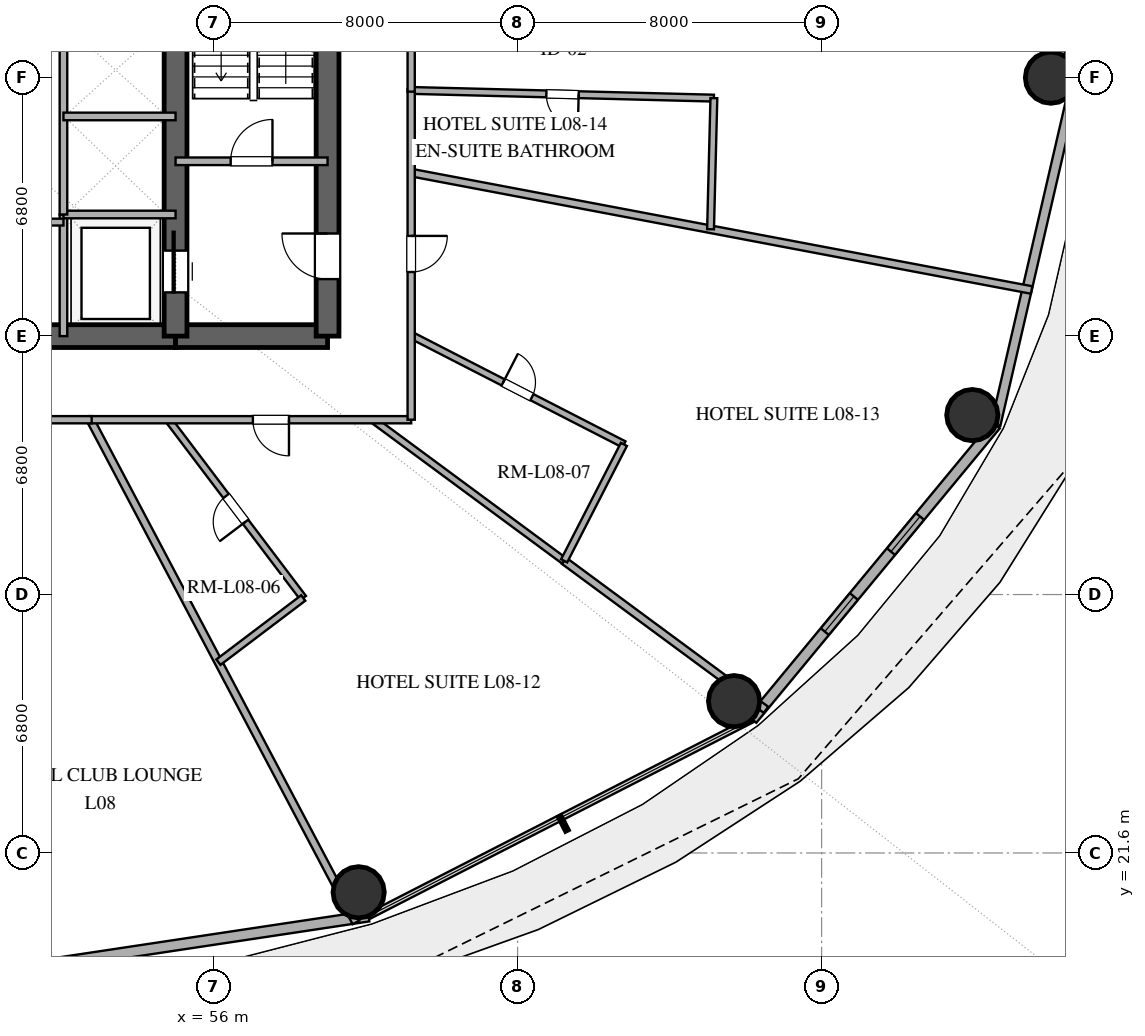
"""IFC4 building model, lengths in metres.
Left out: names, types, materials, properties, quantities, classifications, styles, units other than length and angle.
Written with IfcOpenShell. Run it as: python <this file> out.ifc"""

import sys

from ifc_helpers import new_model, si_unit, direction, frame, frame_2d, origin, origin_2d, place, context, subcontext, project, spatial, rectangle, hollow_circle, extrude, element, fill, save


model = new_model("IFC4")
c1 = context("Model", 3, precision=1e-05, world=origin(), true_north=direction((0.0, 1.0)))
c2 = subcontext(c1, "Body", "Model", "MODEL_VIEW")
j1 = project(units=[si_unit("LENGTHUNIT", "METRE"), si_unit("PLANEANGLEUNIT", "RADIAN")], contexts=[c1])
p1 = place(None, origin())
s1 = spatial("IfcSite", under=j1, at=p1, CompositionType="ELEMENT")
p2 = place(p1, origin())
s2 = spatial("IfcBuilding", under=s1, at=p2, CompositionType="ELEMENT")
p3 = place(p2, frame((0.0, 0.0, 39.0)))
s3 = spatial("IfcBuildingStorey", under=s2, at=p3, CompositionType="ELEMENT", Elevation=39.0)
p4 = place(p3, frame((41.0, 35.2, 0.0), z_axis=(0.0, 0.0, 1.0), x_axis=(1.0, 0.0, 0.0)))
e1 = element("IfcWall", 1, at=p4, inside=s3, PredefinedType="SHEAR", context=c2, shape_type="SweptSolid", body=[
    extrude(rectangle(XDim=14.0, YDim=0.6, at=frame_2d((7.0, 0.0))), origin(), (0.0, 0.0, 1.0), 3.38),
])
p5 = place(p4, frame((6.1, 0.0, 0.0)))
e2 = element("IfcOpeningElement", 2, at=p5, cuts=e1, PredefinedType="OPENING", context=c2, shape_type="SweptSolid", body=[
    extrude(rectangle(XDim=1.8, YDim=2.25, at=frame_2d((0.9, 1.125))), frame((0.0, 0.31, 0.0), z_axis=(0.0, -1.0, 0.0), x_axis=(1.0, 0.0, 0.0)), (0.0, 0.0, 1.0), 0.62),
])
p6 = place(p3, frame((55.0, 35.2, 0.0), z_axis=(0.0, 0.0, 1.0), x_axis=(1.0, 0.0, 0.0)))
e3 = element("IfcWall", 3, at=p6, inside=s3, PredefinedType="SHEAR", context=c2, shape_type="SweptSolid", body=[
    extrude(rectangle(XDim=4.0, YDim=0.6, at=frame_2d((2.0, 0.0))), origin(), (0.0, 0.0, 1.0), 3.38),
])
p7 = place(p3, frame((59.0, 35.2, 0.0), z_axis=(0.0, 0.0, 1.0), x_axis=(0.0, 1.0, 0.0)))
e4 = element("IfcWall", 4, at=p7, inside=s3, PredefinedType="SHEAR", context=c2, shape_type="SweptSolid", body=[
    extrude(rectangle(XDim=13.6, YDim=0.6, at=frame_2d((6.8, 0.0))), origin(), (0.0, 0.0, 1.0), 3.38),
])
p8 = place(p7, frame((1.5, 0.0, 0.0)))
e5 = element("IfcOpeningElement", 5, at=p8, cuts=e4, PredefinedType="OPENING", context=c2, shape_type="SweptSolid", body=[
    extrude(rectangle(XDim=1.2, YDim=2.15, at=frame_2d((0.6, 1.075))), frame((0.0, 0.31, 0.0), z_axis=(0.0, -1.0, 0.0), x_axis=(1.0, 0.0, 0.0)), (0.0, 0.0, 1.0), 0.62),
])
p9 = place(p3, frame((55.0, 35.2, 0.0), z_axis=(0.0, 0.0, 1.0), x_axis=(0.0, 1.0, 0.0)))
e6 = element("IfcWall", 6, at=p9, inside=s3, PredefinedType="SHEAR", context=c2, shape_type="SweptSolid", body=[
    extrude(rectangle(XDim=13.6, YDim=0.6, at=frame_2d((6.8, 0.0))), origin(), (0.0, 0.0, 1.0), 3.38),
])
p10 = place(p9, frame((1.15, 0.0, 0.0)))
e7 = element("IfcOpeningElement", 7, at=p10, cuts=e6, PredefinedType="OPENING", context=c2, shape_type="SweptSolid", body=[
    extrude(rectangle(XDim=1.1, YDim=2.2, at=frame_2d((0.55, 1.1))), frame((0.0, 0.31, 0.0), z_axis=(0.0, -1.0, 0.0), x_axis=(1.0, 0.0, 0.0)), (0.0, 0.0, 1.0), 0.62),
])
for number, where, z_axis, x_axis in (
    (8, (78.035, 42.0, 0.0), (0.0, 0.0, 1.0), (1.0, 0.0, 0.0)),
    (9, (59.818, 20.566, 0.0), (0.0, 0.0, 1.0), (1.0, 0.0, 0.0)),
    (10, (69.697, 25.595, 0.0), (0.0, 0.0, 1.0), (1.0, 0.0, 0.0)),
    (11, (75.966, 33.122, 0.0), (0.0, 0.0, 1.0), (1.0, 0.0, 0.0)),
):
    element("IfcColumn", number, at=place(p3, frame(where, z_axis=z_axis, x_axis=x_axis)), inside=s3, PredefinedType="COLUMN", context=c2, shape_type="SweptSolid", body=[
        extrude(hollow_circle(Radius=0.675, WallThickness=0.036, at=origin_2d()), origin(), (0.0, 0.0, 1.0), 3.38),
    ])
p11 = place(p3, frame((78.696, 42.0, 0.0), z_axis=(0.0, 0.0, 1.0), x_axis=(-0.225454452941, 0.974253709076, 0.0)))
e12 = element("IfcWall", 12, at=p11, inside=s3, PredefinedType="SOLIDWALL", context=c2, shape_type="SweptSolid", body=[
    extrude(rectangle(XDim=9.38, YDim=0.28, at=frame_2d((4.69, 0.0))), origin(), (0.0, 0.0, 1.0), 3.38),
])
p12 = place(p11, frame((1.579, 0.0, 0.0)))
e13 = element("IfcOpeningElement", 13, at=p12, cuts=e12, PredefinedType="OPENING", context=c2, shape_type="SweptSolid", body=[
    extrude(rectangle(XDim=1.6, YDim=2.25, at=frame_2d((0.8, 1.125))), frame((0.0, 0.15, 0.0), z_axis=(0.0, -1.0, 0.0), x_axis=(1.0, 0.0, 0.0)), (0.0, 0.0, 1.0), 0.3),
])
p13 = place(p3, frame((48.0, 18.12, 0.0), z_axis=(0.0, 0.0, 1.0), x_axis=(0.988864835849, 0.148816452121, 0.0)))
e14 = element("IfcWall", 14, at=p13, inside=s3, PredefinedType="SOLIDWALL", context=c2, shape_type="SweptSolid", body=[
    extrude(rectangle(XDim=12.214, YDim=0.28, at=frame_2d((6.107, 0.0))), origin(), (0.0, 0.0, 1.0), 3.38),
])
p14 = place(p13, frame((1.531, 0.0, 0.0)))
e15 = element("IfcOpeningElement", 15, at=p14, cuts=e14, PredefinedType="OPENING", context=c2, shape_type="SweptSolid", body=[
    extrude(rectangle(XDim=1.05, YDim=2.2, at=frame_2d((0.525, 1.1))), frame((0.0, 0.15, 0.0), z_axis=(0.0, -1.0, 0.0), x_axis=(1.0, 0.0, 0.0)), (0.0, 0.0, 1.0), 0.3),
])
p15 = place(p3, frame((70.174, 25.114, 0.0), z_axis=(0.0, 0.0, 1.0), x_axis=(0.637296809613, 0.770618437657, 0.0)))
e16 = element("IfcWall", 16, at=p15, inside=s3, PredefinedType="SOLIDWALL", context=c2, shape_type="SweptSolid", body=[
    extrude(rectangle(XDim=10.053, YDim=0.28, at=frame_2d((5.027, 0.0))), origin(), (0.0, 0.0, 1.0), 3.38),
])
p16 = place(p15, frame((2.998, 0.0, 0.85)))
e17 = element("IfcOpeningElement", 17, at=p16, cuts=e16, PredefinedType="OPENING", context=c2, shape_type="SweptSolid", body=[
    extrude(rectangle(XDim=1.2, YDim=1.6, at=frame_2d((0.6, 0.8))), frame((0.0, 0.15, 0.0), z_axis=(0.0, -1.0, 0.0), x_axis=(1.0, 0.0, 0.0)), (0.0, 0.0, 1.0), 0.3),
])
p17 = place(p15, frame((5.73, 0.0, 0.85)))
e18 = element("IfcOpeningElement", 18, at=p17, cuts=e16, PredefinedType="OPENING", context=c2, shape_type="SweptSolid", body=[
    extrude(rectangle(XDim=1.2, YDim=1.6, at=frame_2d((0.6, 0.8))), frame((0.0, 0.15, 0.0), z_axis=(0.0, -1.0, 0.0), x_axis=(1.0, 0.0, 0.0)), (0.0, 0.0, 1.0), 0.3),
])
p18 = place(p3, frame((76.581, 32.862, 0.0), z_axis=(0.0, 0.0, 1.0), x_axis=(0.225454452941, 0.974253709076, 0.0)))
e19 = element("IfcWall", 19, at=p18, inside=s3, PredefinedType="SOLIDWALL", context=c2, shape_type="SweptSolid", body=[
    extrude(rectangle(XDim=9.38, YDim=0.25, at=frame_2d((4.69, 0.0))), origin(), (0.0, 0.0, 1.0), 3.38),
])
p19 = place(p3, frame((55.0, 39.8, 0.0), z_axis=(0.0, 0.0, 1.0), x_axis=(1.0, 0.0, 0.0)))
e20 = element("IfcWall", 20, at=p19, inside=s3, PredefinedType="SOLIDWALL", context=c2, shape_type="SweptSolid", body=[
    extrude(rectangle(XDim=4.0, YDim=0.2, at=frame_2d((2.0, 0.0))), origin(), (0.0, 0.0, 1.0), 2.74),
])
p20 = place(p19, frame((1.45, 0.0, 0.0)))
e21 = element("IfcOpeningElement", 21, at=p20, cuts=e20, PredefinedType="OPENING", context=c2, shape_type="SweptSolid", body=[
    extrude(rectangle(XDim=1.1, YDim=2.15, at=frame_2d((0.55, 1.075))), frame((0.0, 0.11, 0.0), z_axis=(0.0, -1.0, 0.0), x_axis=(1.0, 0.0, 0.0)), (0.0, 0.0, 1.0), 0.22),
])
p21 = place(p3, frame((52.05, 35.2, 0.0), z_axis=(0.0, 0.0, 1.0), x_axis=(0.0, 1.0, 0.0)))
e22 = element("IfcWall", 22, at=p21, inside=s3, PredefinedType="SOLIDWALL", context=c2, shape_type="SweptSolid", body=[
    extrude(rectangle(XDim=3.2, YDim=0.2, at=frame_2d((1.6, 0.0))), origin(), (0.0, 0.0, 1.0), 2.74),
])
p22 = place(p3, frame((52.05, 38.4, 0.0), z_axis=(0.0, 0.0, 1.0), x_axis=(1.0, 0.0, 0.0)))
e23 = element("IfcWall", 23, at=p22, inside=s3, PredefinedType="SOLIDWALL", context=c2, shape_type="SweptSolid", body=[
    extrude(rectangle(XDim=2.95, YDim=0.2, at=frame_2d((1.475, 0.0))), origin(), (0.0, 0.0, 1.0), 2.74),
])
p23 = place(p3, frame((52.05, 38.4, 0.0), z_axis=(0.0, 0.0, 1.0), x_axis=(0.0, 1.0, 0.0)))
e24 = element("IfcWall", 24, at=p23, inside=s3, PredefinedType="SOLIDWALL", context=c2, shape_type="SweptSolid", body=[
    extrude(rectangle(XDim=10.4, YDim=0.2, at=frame_2d((5.2, 0.0))), origin(), (0.0, 0.0, 1.0), 2.74),
])
p24 = place(p23, frame((8.2, 0.0, 0.0)))
e25 = element("IfcOpeningElement", 25, at=p24, cuts=e24, PredefinedType="OPENING", context=c2, shape_type="SweptSolid", body=[
    extrude(rectangle(XDim=1.2, YDim=2.2, at=frame_2d((0.6, 1.1))), frame((0.0, 0.11, 0.0), z_axis=(0.0, -1.0, 0.0), x_axis=(1.0, 0.0, 0.0)), (0.0, 0.0, 1.0), 0.22),
])
p25 = place(p3, frame((52.05, 40.98, 0.0), z_axis=(0.0, 0.0, 1.0), x_axis=(1.0, 0.0, 0.0)))
e26 = element("IfcWall", 26, at=p25, inside=s3, PredefinedType="SOLIDWALL", context=c2, shape_type="SweptSolid", body=[
    extrude(rectangle(XDim=2.95, YDim=0.2, at=frame_2d((1.475, 0.0))), origin(), (0.0, 0.0, 1.0), 2.74),
])
p26 = place(p3, frame((49.9, 38.2, 0.0), z_axis=(0.0, 0.0, 1.0), x_axis=(1.0, 0.0, 0.0)))
e27 = element("IfcWall", 27, at=p26, inside=s3, PredefinedType="PLUMBINGWALL", context=c2, shape_type="SweptSolid", body=[
    extrude(rectangle(XDim=2.15, YDim=0.18, at=frame_2d((1.075, 0.0))), origin(), (0.0, 0.0, 1.0), 2.74),
])
p27 = place(p3, frame((61.2, 39.502, 0.0), z_axis=(0.0, 0.0, 1.0), x_axis=(0.982565603173, -0.185916205484, 0.0)))
e28 = element("IfcWall", 28, at=p27, inside=s3, PredefinedType="PARTITIONING", context=c2, shape_type="SweptSolid", body=[
    extrude(rectangle(XDim=16.616, YDim=0.2, at=frame_2d((8.308, 0.0))), origin(), (0.0, 0.0, 1.0), 2.74),
])
p28 = place(p3, frame((69.165, 41.462, 0.0), z_axis=(0.0, 0.0, 1.0), x_axis=(-0.999676564425, 0.025431605115, 0.0)))
e29 = element("IfcWall", 29, at=p28, inside=s3, PredefinedType="PLUMBINGWALL", context=c2, shape_type="SweptSolid", body=[
    extrude(rectangle(XDim=7.968, YDim=0.18, at=frame_2d((3.984, 0.0))), origin(), (0.0, 0.0, 1.0), 2.74),
])
p29 = place(p28, frame((3.559, 0.0, 0.0)))
e30 = element("IfcOpeningElement", 30, at=p29, cuts=e29, PredefinedType="OPENING", context=c2, shape_type="SweptSolid", body=[
    extrude(rectangle(XDim=0.85, YDim=2.1, at=frame_2d((0.425, 1.05))), frame((0.0, 0.1, 0.0), z_axis=(0.0, -1.0, 0.0), x_axis=(1.0, 0.0, 0.0)), (0.0, 0.0, 1.0), 0.2),
])
p30 = place(p3, frame((52.757, 33.0, 0.0), z_axis=(0.0, 0.0, 1.0), x_axis=(0.467270516294, -0.884114395654, 0.0)))
e31 = element("IfcWall", 31, at=p30, inside=s3, PredefinedType="PARTITIONING", context=c2, shape_type="SweptSolid", body=[
    extrude(rectangle(XDim=14.96, YDim=0.2, at=frame_2d((7.48, 0.0))), origin(), (0.0, 0.0, 1.0), 2.74),
])
p31 = place(p3, frame((70.538, 25.366, 0.0), z_axis=(0.0, 0.0, 1.0), x_axis=(-0.804616980297, 0.593794168898, 0.0)))
e32 = element("IfcWall", 32, at=p31, inside=s3, PredefinedType="PARTITIONING", context=c2, shape_type="SweptSolid", body=[
    extrude(rectangle(XDim=6.603, YDim=0.2, at=frame_2d((3.302, 0.0))), origin(), (0.0, 0.0, 1.0), 2.74),
])
p32 = place(p3, frame((61.2, 35.224, 0.0), z_axis=(0.0, 0.0, 1.0), x_axis=(0.889651376734, -0.456640370395, 0.0)))
e33 = element("IfcWall", 33, at=p32, inside=s3, PredefinedType="PLUMBINGWALL", context=c2, shape_type="SweptSolid", body=[
    extrude(rectangle(XDim=6.292, YDim=0.18, at=frame_2d((3.146, 0.0))), origin(), (0.0, 0.0, 1.0), 2.74),
])
p33 = place(p32, frame((2.721, 0.0, 0.0)))
e34 = element("IfcOpeningElement", 34, at=p33, cuts=e33, PredefinedType="OPENING", context=c2, shape_type="SweptSolid", body=[
    extrude(rectangle(XDim=0.85, YDim=2.1, at=frame_2d((0.425, 1.05))), frame((0.0, 0.1, 0.0), z_axis=(0.0, -1.0, 0.0), x_axis=(1.0, 0.0, 0.0)), (0.0, 0.0, 1.0), 0.2),
])
p34 = place(p3, frame((65.225, 29.287, 0.0), z_axis=(0.0, 0.0, 1.0), x_axis=(-0.804582519588, 0.593840861825, 0.0)))
e35 = element("IfcWall", 35, at=p34, inside=s3, PredefinedType="PLUMBINGWALL", context=c2, shape_type="SweptSolid", body=[
    extrude(rectangle(XDim=6.252, YDim=0.18, at=frame_2d((3.126, 0.0))), origin(), (0.0, 0.0, 1.0), 2.74),
])
p35 = place(p3, frame((58.36, 28.309, 0.0), z_axis=(0.0, 0.0, 1.0), x_axis=(-0.603401299207, 0.797437691682, 0.0)))
e36 = element("IfcWall", 36, at=p35, inside=s3, PredefinedType="PLUMBINGWALL", context=c2, shape_type="SweptSolid", body=[
    extrude(rectangle(XDim=5.882, YDim=0.18, at=frame_2d((2.941, 0.0))), origin(), (0.0, 0.0, 1.0), 2.74),
])
p36 = place(p35, frame((2.516, 0.0, 0.0)))
e37 = element("IfcOpeningElement", 37, at=p36, cuts=e36, PredefinedType="OPENING", context=c2, shape_type="SweptSolid", body=[
    extrude(rectangle(XDim=0.85, YDim=2.1, at=frame_2d((0.425, 1.05))), frame((0.0, 0.1, 0.0), z_axis=(0.0, -1.0, 0.0), x_axis=(1.0, 0.0, 0.0)), (0.0, 0.0, 1.0), 0.2),
])
p37 = place(p3, frame((61.2, 33.0, 0.0), z_axis=(0.0, 0.0, 1.0), x_axis=(-1.0, 0.0, 0.0)))
e38 = element("IfcWall", 38, at=p37, inside=s3, PredefinedType="PARTITIONING", context=c2, shape_type="SweptSolid", body=[
    extrude(rectangle(XDim=8.479, YDim=0.19, at=frame_2d((4.24, 0.0))), origin(), (0.0, 0.0, 1.0), 2.74),
])
p38 = place(p37, frame((3.216, 0.0, 0.0)))
e39 = element("IfcOpeningElement", 39, at=p38, cuts=e38, PredefinedType="OPENING", context=c2, shape_type="SweptSolid", body=[
    extrude(rectangle(XDim=0.95, YDim=2.15, at=frame_2d((0.475, 1.075))), frame((0.0, 0.105, 0.0), z_axis=(0.0, -1.0, 0.0), x_axis=(1.0, 0.0, 0.0)), (0.0, 0.0, 1.0), 0.21),
])
p39 = place(p3, frame((52.793, 33.0, 0.0), z_axis=(0.0, 0.0, 1.0), x_axis=(-1.0, 0.0, 0.0)))
e40 = element("IfcWall", 40, at=p39, inside=s3, PredefinedType="PARTITIONING", context=c2, shape_type="SweptSolid", body=[
    extrude(rectangle(XDim=8.754, YDim=0.19, at=frame_2d((4.377, 0.0))), origin(), (0.0, 0.0, 1.0), 2.74),
])
p40 = place(p39, frame((1.744, 0.0, 0.0)))
e41 = element("IfcOpeningElement", 41, at=p40, cuts=e40, PredefinedType="OPENING", context=c2, shape_type="SweptSolid", body=[
    extrude(rectangle(XDim=1.0, YDim=2.2, at=frame_2d((0.5, 1.1))), frame((0.0, 0.105, 0.0), z_axis=(0.0, -1.0, 0.0), x_axis=(1.0, 0.0, 0.0)), (0.0, 0.0, 1.0), 0.21),
])
p41 = place(p39, frame((5.298, 0.0, 0.0)))
e42 = element("IfcOpeningElement", 42, at=p41, cuts=e40, PredefinedType="OPENING", context=c2, shape_type="SweptSolid", body=[
    extrude(rectangle(XDim=0.95, YDim=2.15, at=frame_2d((0.475, 1.075))), frame((0.0, 0.105, 0.0), z_axis=(0.0, -1.0, 0.0), x_axis=(1.0, 0.0, 0.0)), (0.0, 0.0, 1.0), 0.21),
])
p42 = place(p3, frame((61.2, 41.696, 0.0), z_axis=(0.0, 0.0, 1.0), x_axis=(0.0, -1.0, 0.0)))
e43 = element("IfcWall", 43, at=p42, inside=s3, PredefinedType="PARTITIONING", context=c2, shape_type="SweptSolid", body=[
    extrude(rectangle(XDim=8.696, YDim=0.19, at=frame_2d((4.348, 0.0))), origin(), (0.0, 0.0, 1.0), 2.74),
])
p43 = place(p42, frame((3.86, 0.0, 0.0)))
e44 = element("IfcOpeningElement", 44, at=p43, cuts=e43, PredefinedType="OPENING", context=c2, shape_type="SweptSolid", body=[
    extrude(rectangle(XDim=0.95, YDim=2.15, at=frame_2d((0.475, 1.075))), frame((0.0, 0.105, 0.0), z_axis=(0.0, -1.0, 0.0), x_axis=(1.0, 0.0, 0.0)), (0.0, 0.0, 1.0), 0.21),
])
p44 = place(p3, frame((61.2, 47.983, 0.0), z_axis=(0.0, 0.0, 1.0), x_axis=(0.0, -1.0, 0.0)))
e45 = element("IfcWall", 45, at=p44, inside=s3, PredefinedType="PARTITIONING", context=c2, shape_type="SweptSolid", body=[
    extrude(rectangle(XDim=6.351, YDim=0.19, at=frame_2d((3.176, 0.0))), origin(), (0.0, 0.0, 1.0), 2.74),
])
p45 = place(p44, frame((3.907, 0.0, 0.0)))
e46 = element("IfcOpeningElement", 46, at=p45, cuts=e45, PredefinedType="OPENING", context=c2, shape_type="SweptSolid", body=[
    extrude(rectangle(XDim=0.95, YDim=2.15, at=frame_2d((0.475, 1.075))), frame((0.0, 0.105, 0.0), z_axis=(0.0, -1.0, 0.0), x_axis=(1.0, 0.0, 0.0)), (0.0, 0.0, 1.0), 0.21),
])
p46 = place(p3, frame((69.078, 38.012, 0.0), z_axis=(0.0, 0.0, 1.0), x_axis=(0.02539873932, 0.999677399985, 0.0)))
e47 = element("IfcWall", 47, at=p46, inside=s3, PredefinedType="PLUMBINGWALL", context=c2, shape_type="SweptSolid", body=[
    extrude(rectangle(XDim=3.451, YDim=0.18, at=frame_2d((1.726, 0.0))), origin(), (0.0, 0.0, 1.0), 2.74),
])
p47 = place(p3, frame((66.798, 32.351, 0.0), z_axis=(0.0, 0.0, 1.0), x_axis=(-0.456659133546, -0.889641745732, 0.0)))
e48 = element("IfcWall", 48, at=p47, inside=s3, PredefinedType="PLUMBINGWALL", context=c2, shape_type="SweptSolid", body=[
    extrude(rectangle(XDim=3.444, YDim=0.18, at=frame_2d((1.722, 0.0))), origin(), (0.0, 0.0, 1.0), 2.74),
])
p48 = place(p3, frame((56.128, 26.621, 0.0), z_axis=(0.0, 0.0, 1.0), x_axis=(0.797438154909, 0.603400687019, 0.0)))
e49 = element("IfcWall", 49, at=p48, inside=s3, PredefinedType="PLUMBINGWALL", context=c2, shape_type="SweptSolid", body=[
    extrude(rectangle(XDim=2.798, YDim=0.18, at=frame_2d((1.399, 0.0))), origin(), (0.0, 0.0, 1.0), 2.74),
])
p49 = place(p16, origin())
e50 = element("IfcWindow", 50, at=p49, inside=s3, PartitioningType="SINGLE_PANEL", PredefinedType="WINDOW", context=c2, shape_type="SweptSolid", body=[
    extrude(rectangle(XDim=1.2, YDim=1.6, at=frame_2d((0.6, 0.8))), frame((0.0, 0.03, 0.0), z_axis=(0.0, -1.0, 0.0), x_axis=(1.0, 0.0, 0.0)), (0.0, 0.0, 1.0), 0.06),
])
fill(e17, e50)
p50 = place(p17, origin())
e51 = element("IfcWindow", 51, at=p50, inside=s3, PartitioningType="SINGLE_PANEL", PredefinedType="WINDOW", context=c2, shape_type="SweptSolid", body=[
    extrude(rectangle(XDim=1.2, YDim=1.6, at=frame_2d((0.6, 0.8))), frame((0.0, 0.03, 0.0), z_axis=(0.0, -1.0, 0.0), x_axis=(1.0, 0.0, 0.0)), (0.0, 0.0, 1.0), 0.06),
])
fill(e18, e51)
p51 = place(p10, origin())
e52 = element("IfcDoor", 52, at=p51, inside=s3, OperationType="SLIDING_TO_RIGHT", PredefinedType="DOOR", context=c2, shape_type="SweptSolid", body=[
    extrude(rectangle(XDim=1.1, YDim=2.2, at=frame_2d((0.55, 1.1))), frame((0.0, 0.025, 0.0), z_axis=(0.0, -1.0, 0.0), x_axis=(1.0, 0.0, 0.0)), (0.0, 0.0, 1.0), 0.05),
])
fill(e7, e52)
p52 = place(p8, origin())
e53 = element("IfcDoor", 53, at=p52, inside=s3, OperationType="SINGLE_SWING_RIGHT", PredefinedType="DOOR", context=c2, shape_type="SweptSolid", body=[
    extrude(rectangle(XDim=1.2, YDim=2.15, at=frame_2d((0.6, 1.075))), frame((0.0, 0.025, 0.0), z_axis=(0.0, -1.0, 0.0), x_axis=(1.0, 0.0, 0.0)), (0.0, 0.0, 1.0), 0.05),
])
fill(e5, e53)
p53 = place(p20, origin())
e54 = element("IfcDoor", 54, at=p53, inside=s3, OperationType="SINGLE_SWING_RIGHT", PredefinedType="DOOR", context=c2, shape_type="SweptSolid", body=[
    extrude(rectangle(XDim=1.1, YDim=2.15, at=frame_2d((0.55, 1.075))), frame((0.0, 0.025, 0.0), z_axis=(0.0, -1.0, 0.0), x_axis=(1.0, 0.0, 0.0)), (0.0, 0.0, 1.0), 0.05),
])
fill(e21, e54)
p54 = place(p29, origin())
e55 = element("IfcDoor", 55, at=p54, inside=s3, OperationType="SINGLE_SWING_LEFT", PredefinedType="DOOR", context=c2, shape_type="SweptSolid", body=[
    extrude(rectangle(XDim=0.85, YDim=2.1, at=frame_2d((0.425, 1.05))), frame((0.0, 0.025, 0.0), z_axis=(0.0, -1.0, 0.0), x_axis=(1.0, 0.0, 0.0)), (0.0, 0.0, 1.0), 0.05),
])
fill(e30, e55)
p55 = place(p33, origin())
e56 = element("IfcDoor", 56, at=p55, inside=s3, OperationType="SINGLE_SWING_LEFT", PredefinedType="DOOR", context=c2, shape_type="SweptSolid", body=[
    extrude(rectangle(XDim=0.85, YDim=2.1, at=frame_2d((0.425, 1.05))), frame((0.0, 0.025, 0.0), z_axis=(0.0, -1.0, 0.0), x_axis=(1.0, 0.0, 0.0)), (0.0, 0.0, 1.0), 0.05),
])
fill(e34, e56)
p56 = place(p36, origin())
e57 = element("IfcDoor", 57, at=p56, inside=s3, OperationType="SINGLE_SWING_LEFT", PredefinedType="DOOR", context=c2, shape_type="SweptSolid", body=[
    extrude(rectangle(XDim=0.85, YDim=2.1, at=frame_2d((0.425, 1.05))), frame((0.0, 0.025, 0.0), z_axis=(0.0, -1.0, 0.0), x_axis=(1.0, 0.0, 0.0)), (0.0, 0.0, 1.0), 0.05),
])
fill(e37, e57)
p57 = place(p38, origin())
e58 = element("IfcDoor", 58, at=p57, inside=s3, OperationType="SINGLE_SWING_LEFT", PredefinedType="DOOR", context=c2, shape_type="SweptSolid", body=[
    extrude(rectangle(XDim=0.95, YDim=2.15, at=frame_2d((0.475, 1.075))), frame((0.0, 0.025, 0.0), z_axis=(0.0, -1.0, 0.0), x_axis=(1.0, 0.0, 0.0)), (0.0, 0.0, 1.0), 0.05),
])
fill(e39, e58)
p58 = place(p43, origin())
e59 = element("IfcDoor", 59, at=p58, inside=s3, OperationType="SINGLE_SWING_LEFT", PredefinedType="DOOR", context=c2, shape_type="SweptSolid", body=[
    extrude(rectangle(XDim=0.95, YDim=2.15, at=frame_2d((0.475, 1.075))), frame((0.0, 0.025, 0.0), z_axis=(0.0, -1.0, 0.0), x_axis=(1.0, 0.0, 0.0)), (0.0, 0.0, 1.0), 0.05),
])
fill(e44, e59)
save(model, sys.argv[1])
